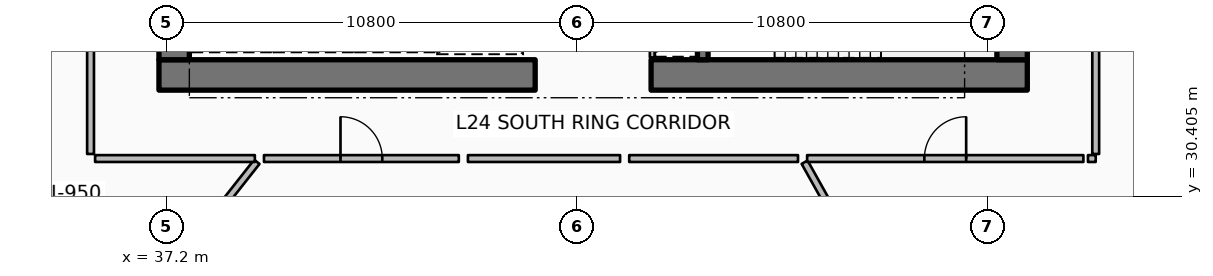
"""IFC4 building model, lengths in metres.
Left out: names, types, materials, properties, quantities, classifications, styles, units other than length and angle.
Written with IfcOpenShell. Run it as: python <this file> out.ifc"""

import sys

from ifc_helpers import new_model, si_unit, direction, frame, frame_2d, origin, place, context, subcontext, project, spatial, rectangle, extrude, element, fill, save


model = new_model("IFC4")
c1 = context("Model", 3, precision=1e-05, world=origin(), true_north=direction((0.0, 1.0)))
c2 = subcontext(c1, "Body", "Model", "MODEL_VIEW")
j1 = project(units=[si_unit("LENGTHUNIT", "METRE"), si_unit("PLANEANGLEUNIT", "RADIAN")], contexts=[c1])
p1 = place(None, origin())
s1 = spatial("IfcSite", under=j1, at=p1, CompositionType="ELEMENT")
p2 = place(p1, origin())
s2 = spatial("IfcBuilding", under=s1, at=p2, CompositionType="ELEMENT")
p3 = place(p2, frame((0.0, 0.0, 97.65)))
s3 = spatial("IfcBuildingStorey", under=s2, at=p3, CompositionType="ELEMENT", Elevation=97.65)
p4 = place(p3, frame((37.0, 33.6, 0.0), z_axis=(0.0, 0.0, 1.0), x_axis=(1.0, 0.0, 0.0)))
e1 = element("IfcWall", 1, at=p4, inside=s3, PredefinedType="SHEAR", context=c2, shape_type="SweptSolid", body=[
    extrude(rectangle(XDim=9.9, YDim=0.8, at=frame_2d((4.95, 0.0))), origin(), (0.0, 0.0, 1.0), 3.75),
])
p5 = place(p3, frame((49.95, 33.6, 0.0), z_axis=(0.0, 0.0, 1.0), x_axis=(1.0, 0.0, 0.0)))
e2 = element("IfcWall", 2, at=p5, inside=s3, PredefinedType="SHEAR", context=c2, shape_type="SweptSolid", body=[
    extrude(rectangle(XDim=9.9, YDim=0.8, at=frame_2d((4.95, 0.0))), origin(), (0.0, 0.0, 1.0), 3.75),
])
for number, where, z_axis, x_axis in (
    (3, (37.4, 34.0, 0.0), (0.0, 0.0, 1.0), (0.0, 1.0, 0.0)),
    (4, (59.45, 34.0, 0.0), (0.0, 0.0, 1.0), (0.0, 1.0, 0.0)),
):
    element("IfcWall", number, at=place(p3, frame(where, z_axis=z_axis, x_axis=x_axis)), inside=s3, PredefinedType="SHEAR", context=c2, shape_type="SweptSolid", body=[
        extrude(rectangle(XDim=16.0, YDim=0.8, at=frame_2d((8.0, 0.0))), origin(), (0.0, 0.0, 1.0), 3.75),
    ])
p6 = place(p3, frame((51.31, 34.0, 0.0), z_axis=(0.0, 0.0, 1.0), x_axis=(0.0, 1.0, 0.0)))
e5 = element("IfcWall", 5, at=p6, inside=s3, PredefinedType="SHEAR", context=c2, shape_type="SweptSolid", body=[
    extrude(rectangle(XDim=3.5, YDim=0.28, at=frame_2d((1.75, 0.0))), origin(), (0.0, 0.0, 1.0), 3.75),
])
p7 = place(p3, frame((49.98, 34.06, 0.0), z_axis=(0.0, 0.0, 1.0), x_axis=(0.0, 1.0, 0.0)))
e6 = element("IfcWall", 6, at=p7, inside=s3, PredefinedType="PARTITIONING", context=c2, shape_type="SweptSolid", body=[
    extrude(rectangle(XDim=3.4, YDim=0.125, at=frame_2d((1.7, 0.0))), origin(), (0.0, 0.0, 1.0), 2.94),
])
p8 = place(p3, frame((39.575, 31.314, 0.0), z_axis=(0.0, 0.0, 1.0), x_axis=(-0.619083417853, -0.785325233098, 0.0)))
e7 = element("IfcWall", 7, at=p8, inside=s3, PredefinedType="PARTITIONING", context=c2, shape_type="SweptSolid", body=[
    extrude(rectangle(XDim=15.063, YDim=0.18, at=frame_2d((7.532, 0.0))), origin(), (0.0, 0.0, 1.0), 2.94),
])
p9 = place(p3, frame((53.99, 31.304, 0.0), z_axis=(0.0, 0.0, 1.0), x_axis=(0.488628442553, -0.872491974249, 0.0)))
e8 = element("IfcWall", 8, at=p9, inside=s3, PredefinedType="PARTITIONING", context=c2, shape_type="SweptSolid", body=[
    extrude(rectangle(XDim=11.563, YDim=0.18, at=frame_2d((5.782, 0.0))), origin(), (0.0, 0.0, 1.0), 2.94),
])
p10 = place(p3, frame((35.2, 34.712, 0.0), z_axis=(0.0, 0.0, 1.0), x_axis=(0.0, -1.0, 0.0)))
e9 = element("IfcWall", 9, at=p10, inside=s3, PredefinedType="PARTITIONING", context=c2, shape_type="SweptSolid", body=[
    extrude(rectangle(XDim=3.192, YDim=0.18, at=frame_2d((1.596, 0.0))), origin(), (0.0, 0.0, 1.0), 2.94),
])
p11 = place(p3, frame((35.32, 31.4, 0.0), z_axis=(0.0, 0.0, 1.0), x_axis=(1.0, 0.0, 0.0)))
e10 = element("IfcWall", 10, at=p11, inside=s3, PredefinedType="PARTITIONING", context=c2, shape_type="SweptSolid", body=[
    extrude(rectangle(XDim=4.204, YDim=0.18, at=frame_2d((2.102, 0.0))), origin(), (0.0, 0.0, 1.0), 2.94),
])
p12 = place(p3, frame((33.053, 30.418, 0.0), z_axis=(0.0, 0.0, 1.0), x_axis=(0.702647387595, -0.711538227157, 0.0)))
e11 = element("IfcWall", 11, at=p12, inside=s3, PredefinedType="PARTITIONING", context=c2, shape_type="SweptSolid", body=[
    extrude(rectangle(XDim=4.503, YDim=0.125, at=frame_2d((2.252, 0.0))), origin(), (0.0, 0.0, 1.0), 2.94),
])
p13 = place(p12, frame((1.802, 0.0, 0.0)))
e12 = element("IfcOpeningElement", 12, at=p13, cuts=e11, PredefinedType="OPENING", context=c2, shape_type="SweptSolid", body=[
    extrude(rectangle(XDim=0.9, YDim=2.08, at=frame_2d((0.45, 1.04))), frame((0.0, 0.073, 0.0), z_axis=(0.0, -1.0, 0.0), x_axis=(1.0, 0.0, 0.0)), (0.0, 0.0, 1.0), 0.145),
])
p14 = place(p3, frame((39.764, 31.4, 0.0), z_axis=(0.0, 0.0, 1.0), x_axis=(1.0, 0.0, 0.0)))
e13 = element("IfcWall", 13, at=p14, inside=s3, PredefinedType="PARTITIONING", context=c2, shape_type="SweptSolid", body=[
    extrude(rectangle(XDim=5.127, YDim=0.18, at=frame_2d((2.563, 0.0))), origin(), (0.0, 0.0, 1.0), 2.94),
])
p15 = place(p14, frame((2.013, 0.0, 0.0)))
e14 = element("IfcOpeningElement", 14, at=p15, cuts=e13, PredefinedType="OPENING", context=c2, shape_type="SweptSolid", body=[
    extrude(rectangle(XDim=1.1, YDim=2.1, at=frame_2d((0.55, 1.05))), frame((0.0, 0.1, 0.0), z_axis=(0.0, -1.0, 0.0), x_axis=(1.0, 0.0, 0.0)), (0.0, 0.0, 1.0), 0.2),
])
p16 = place(p3, frame((45.131, 31.4, 0.0), z_axis=(0.0, 0.0, 1.0), x_axis=(1.0, 0.0, 0.0)))
e15 = element("IfcWall", 15, at=p16, inside=s3, PredefinedType="PARTITIONING", context=c2, shape_type="SweptSolid", body=[
    extrude(rectangle(XDim=4.004, YDim=0.18, at=frame_2d((2.002, 0.0))), origin(), (0.0, 0.0, 1.0), 2.94),
])
p17 = place(p3, frame((49.375, 31.4, 0.0), z_axis=(0.0, 0.0, 1.0), x_axis=(1.0, 0.0, 0.0)))
e16 = element("IfcWall", 16, at=p17, inside=s3, PredefinedType="PARTITIONING", context=c2, shape_type="SweptSolid", body=[
    extrude(rectangle(XDim=4.442, YDim=0.18, at=frame_2d((2.221, 0.0))), origin(), (0.0, 0.0, 1.0), 2.94),
])
p18 = place(p3, frame((54.056, 31.4, 0.0), z_axis=(0.0, 0.0, 1.0), x_axis=(1.0, 0.0, 0.0)))
e17 = element("IfcWall", 17, at=p18, inside=s3, PredefinedType="PARTITIONING", context=c2, shape_type="SweptSolid", body=[
    extrude(rectangle(XDim=7.27, YDim=0.18, at=frame_2d((3.635, 0.0))), origin(), (0.0, 0.0, 1.0), 2.94),
])
p19 = place(p18, frame((3.085, 0.0, 0.0)))
e18 = element("IfcOpeningElement", 18, at=p19, cuts=e17, PredefinedType="OPENING", context=c2, shape_type="SweptSolid", body=[
    extrude(rectangle(XDim=1.1, YDim=2.1, at=frame_2d((0.55, 1.05))), frame((0.0, 0.1, 0.0), z_axis=(0.0, -1.0, 0.0), x_axis=(1.0, 0.0, 0.0)), (0.0, 0.0, 1.0), 0.2),
])
p20 = place(p3, frame((61.446, 31.4, 0.0), z_axis=(0.0, 0.0, 1.0), x_axis=(1.0, 0.0, 0.0)))
e19 = element("IfcWall", 19, at=p20, inside=s3, PredefinedType="PARTITIONING", context=c2, shape_type="SweptSolid", body=[
    extrude(rectangle(XDim=0.204, YDim=0.18, at=frame_2d((0.102, 0.0))), origin(), (0.0, 0.0, 1.0), 2.94),
])
p21 = place(p3, frame((61.65, 31.52, 0.0), z_axis=(0.0, 0.0, 1.0), x_axis=(0.0, 1.0, 0.0)))
e20 = element("IfcWall", 20, at=p21, inside=s3, PredefinedType="PARTITIONING", context=c2, shape_type="SweptSolid", body=[
    extrude(rectangle(XDim=6.51, YDim=0.18, at=frame_2d((3.255, 0.0))), origin(), (0.0, 0.0, 1.0), 2.94),
])
p22 = place(p15, origin())
e21 = element("IfcDoor", 21, at=p22, inside=s3, OperationType="SINGLE_SWING_LEFT", PredefinedType="DOOR", context=c2, shape_type="SweptSolid", body=[
    extrude(rectangle(XDim=1.1, YDim=2.1, at=frame_2d((0.55, 1.05))), frame((0.0, 0.025, 0.0), z_axis=(0.0, -1.0, 0.0), x_axis=(1.0, 0.0, 0.0)), (0.0, 0.0, 1.0), 0.05),
])
fill(e14, e21)
p23 = place(p19, origin())
e22 = element("IfcDoor", 22, at=p23, inside=s3, OperationType="SINGLE_SWING_RIGHT", PredefinedType="DOOR", context=c2, shape_type="SweptSolid", body=[
    extrude(rectangle(XDim=1.1, YDim=2.1, at=frame_2d((0.55, 1.05))), frame((0.0, 0.025, 0.0), z_axis=(0.0, -1.0, 0.0), x_axis=(1.0, 0.0, 0.0)), (0.0, 0.0, 1.0), 0.05),
])
fill(e18, e22)
save(model, sys.argv[1])
